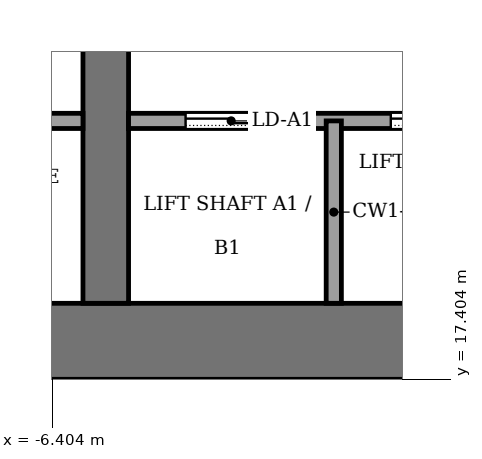
"""IFC4 building model, lengths in metres.
Left out: names, types, materials, properties, quantities, classifications, styles, units other than length and angle.
Written with IfcOpenShell. Run it as: python <this file> out.ifc"""

import sys

from ifc_helpers import new_model, si_unit, direction, frame, frame_2d, origin, place, context, subcontext, project, spatial, rectangle, extrude, element, fill, save


model = new_model("IFC4")
c1 = context("Model", 3, precision=1e-05, world=origin(), true_north=direction((0.0, 1.0)))
c2 = subcontext(c1, "Body", "Model", "MODEL_VIEW")
j1 = project(units=[si_unit("LENGTHUNIT", "METRE"), si_unit("PLANEANGLEUNIT", "RADIAN")], contexts=[c1])
p1 = place(None, origin())
s1 = spatial("IfcSite", under=j1, at=p1, CompositionType="ELEMENT")
p2 = place(p1, origin())
s2 = spatial("IfcBuilding", under=s1, at=p2, CompositionType="ELEMENT")
p3 = place(p2, frame((0.0, 0.0, 166.0)))
s3 = spatial("IfcBuildingStorey", under=s2, at=p3, CompositionType="ELEMENT", Elevation=166.0)
p4 = place(p3, frame((-13.6, 17.9, -0.13), z_axis=(0.0, 0.0, 1.0), x_axis=(1.0, 0.0, 0.0)))
e1 = element("IfcWall", 1, at=p4, inside=s3, PredefinedType="SHEAR", context=c2, shape_type="SweptSolid", body=[
    extrude(rectangle(XDim=27.2, YDim=1.0, at=frame_2d((13.6, 0.0))), origin(), (0.0, 0.0, 1.0), 3.88),
])
p5 = place(p3, frame((-5.7, 18.4, -0.13), z_axis=(0.0, 0.0, 1.0), x_axis=(0.0, 1.0, 0.0)))
e2 = element("IfcWall", 2, at=p5, inside=s3, PredefinedType="SHEAR", context=c2, shape_type="SweptSolid", body=[
    extrude(rectangle(XDim=19.2, YDim=0.6, at=frame_2d((9.6, 0.0))), origin(), (0.0, 0.0, 1.0), 3.88),
])
p6 = place(p5, frame((8.35, 0.0, 0.13)))
e3 = element("IfcOpeningElement", 3, at=p6, cuts=e2, PredefinedType="OPENING", context=c2, shape_type="SweptSolid", body=[
    extrude(rectangle(XDim=0.9, YDim=2.1, at=frame_2d((0.45, 1.05))), frame((0.0, 0.31, 0.0), z_axis=(0.0, -1.0, 0.0), x_axis=(1.0, 0.0, 0.0)), (0.0, 0.0, 1.0), 0.62),
])
p7 = place(p3, frame((-12.6, 20.8, 0.0), z_axis=(0.0, 0.0, 1.0), x_axis=(1.0, 0.0, 0.0)))
e4 = element("IfcWall", 4, at=p7, inside=s3, PredefinedType="PARTITIONING", context=c2, shape_type="SweptSolid", body=[
    extrude(rectangle(XDim=6.6, YDim=0.2, at=frame_2d((3.3, 0.0))), origin(), (0.0, 0.0, 1.0), 3.75),
])
p8 = place(p7, frame((1.15, 0.0, 0.0)))
e5 = element("IfcOpeningElement", 5, at=p8, cuts=e4, PredefinedType="OPENING", context=c2, shape_type="SweptSolid", body=[
    extrude(rectangle(XDim=1.0, YDim=2.1, at=frame_2d((0.5, 1.05))), frame((0.0, 0.11, 0.0), z_axis=(0.0, -1.0, 0.0), x_axis=(1.0, 0.0, 0.0)), (0.0, 0.0, 1.0), 0.22),
])
p9 = place(p7, frame((4.45, 0.0, 0.0)))
e6 = element("IfcOpeningElement", 6, at=p9, cuts=e4, PredefinedType="OPENING", context=c2, shape_type="SweptSolid", body=[
    extrude(rectangle(XDim=1.0, YDim=2.1, at=frame_2d((0.5, 1.05))), frame((0.0, 0.11, 0.0), z_axis=(0.0, -1.0, 0.0), x_axis=(1.0, 0.0, 0.0)), (0.0, 0.0, 1.0), 0.22),
])
p10 = place(p3, frame((-5.4, 20.8, 0.0), z_axis=(0.0, 0.0, 1.0), x_axis=(1.0, 0.0, 0.0)))
e7 = element("IfcWall", 7, at=p10, inside=s3, PredefinedType="PARTITIONING", context=c2, shape_type="SweptSolid", body=[
    extrude(rectangle(XDim=10.8, YDim=0.2, at=frame_2d((5.4, 0.0))), origin(), (0.0, 0.0, 1.0), 3.75),
])
p11 = place(p10, frame((0.75, 0.0, 0.0)))
e8 = element("IfcOpeningElement", 8, at=p11, cuts=e7, PredefinedType="OPENING", context=c2, shape_type="SweptSolid", body=[
    extrude(rectangle(XDim=1.2, YDim=2.2, at=frame_2d((0.6, 1.1))), frame((0.0, 0.11, 0.0), z_axis=(0.0, -1.0, 0.0), x_axis=(1.0, 0.0, 0.0)), (0.0, 0.0, 1.0), 0.22),
])
p12 = place(p10, frame((3.45, 0.0, 0.0)))
e9 = element("IfcOpeningElement", 9, at=p12, cuts=e7, PredefinedType="OPENING", context=c2, shape_type="SweptSolid", body=[
    extrude(rectangle(XDim=1.2, YDim=2.2, at=frame_2d((0.6, 1.1))), frame((0.0, 0.11, 0.0), z_axis=(0.0, -1.0, 0.0), x_axis=(1.0, 0.0, 0.0)), (0.0, 0.0, 1.0), 0.22),
])
p13 = place(p10, frame((6.15, 0.0, 0.0)))
e10 = element("IfcOpeningElement", 10, at=p13, cuts=e7, PredefinedType="OPENING", context=c2, shape_type="SweptSolid", body=[
    extrude(rectangle(XDim=1.2, YDim=2.2, at=frame_2d((0.6, 1.1))), frame((0.0, 0.11, 0.0), z_axis=(0.0, -1.0, 0.0), x_axis=(1.0, 0.0, 0.0)), (0.0, 0.0, 1.0), 0.22),
])
p14 = place(p10, frame((8.85, 0.0, 0.0)))
e11 = element("IfcOpeningElement", 11, at=p14, cuts=e7, PredefinedType="OPENING", context=c2, shape_type="SweptSolid", body=[
    extrude(rectangle(XDim=1.2, YDim=2.2, at=frame_2d((0.6, 1.1))), frame((0.0, 0.11, 0.0), z_axis=(0.0, -1.0, 0.0), x_axis=(1.0, 0.0, 0.0)), (0.0, 0.0, 1.0), 0.22),
])
p15 = place(p3, frame((-2.7, 18.4, 0.0), z_axis=(0.0, 0.0, 1.0), x_axis=(0.0, 1.0, 0.0)))
e12 = element("IfcWall", 12, at=p15, inside=s3, PredefinedType="PARTITIONING", context=c2, shape_type="SweptSolid", body=[
    extrude(rectangle(XDim=2.4, YDim=0.2, at=frame_2d((1.2, 0.0))), origin(), (0.0, 0.0, 1.0), 3.75),
])
p16 = place(p11, origin())
e13 = element("IfcDoor", 13, at=p16, inside=s3, OperationType="SLIDING_TO_LEFT", PredefinedType="DOOR", context=c2, shape_type="SweptSolid", body=[
    extrude(rectangle(XDim=1.2, YDim=2.2, at=frame_2d((0.6, 1.1))), frame((0.0, 0.025, 0.0), z_axis=(0.0, -1.0, 0.0), x_axis=(1.0, 0.0, 0.0)), (0.0, 0.0, 1.0), 0.05),
])
fill(e8, e13)
p17 = place(p12, origin())
e14 = element("IfcDoor", 14, at=p17, inside=s3, OperationType="SLIDING_TO_LEFT", PredefinedType="DOOR", context=c2, shape_type="SweptSolid", body=[
    extrude(rectangle(XDim=1.2, YDim=2.2, at=frame_2d((0.6, 1.1))), frame((0.0, 0.025, 0.0), z_axis=(0.0, -1.0, 0.0), x_axis=(1.0, 0.0, 0.0)), (0.0, 0.0, 1.0), 0.05),
])
fill(e9, e14)
save(model, sys.argv[1])
